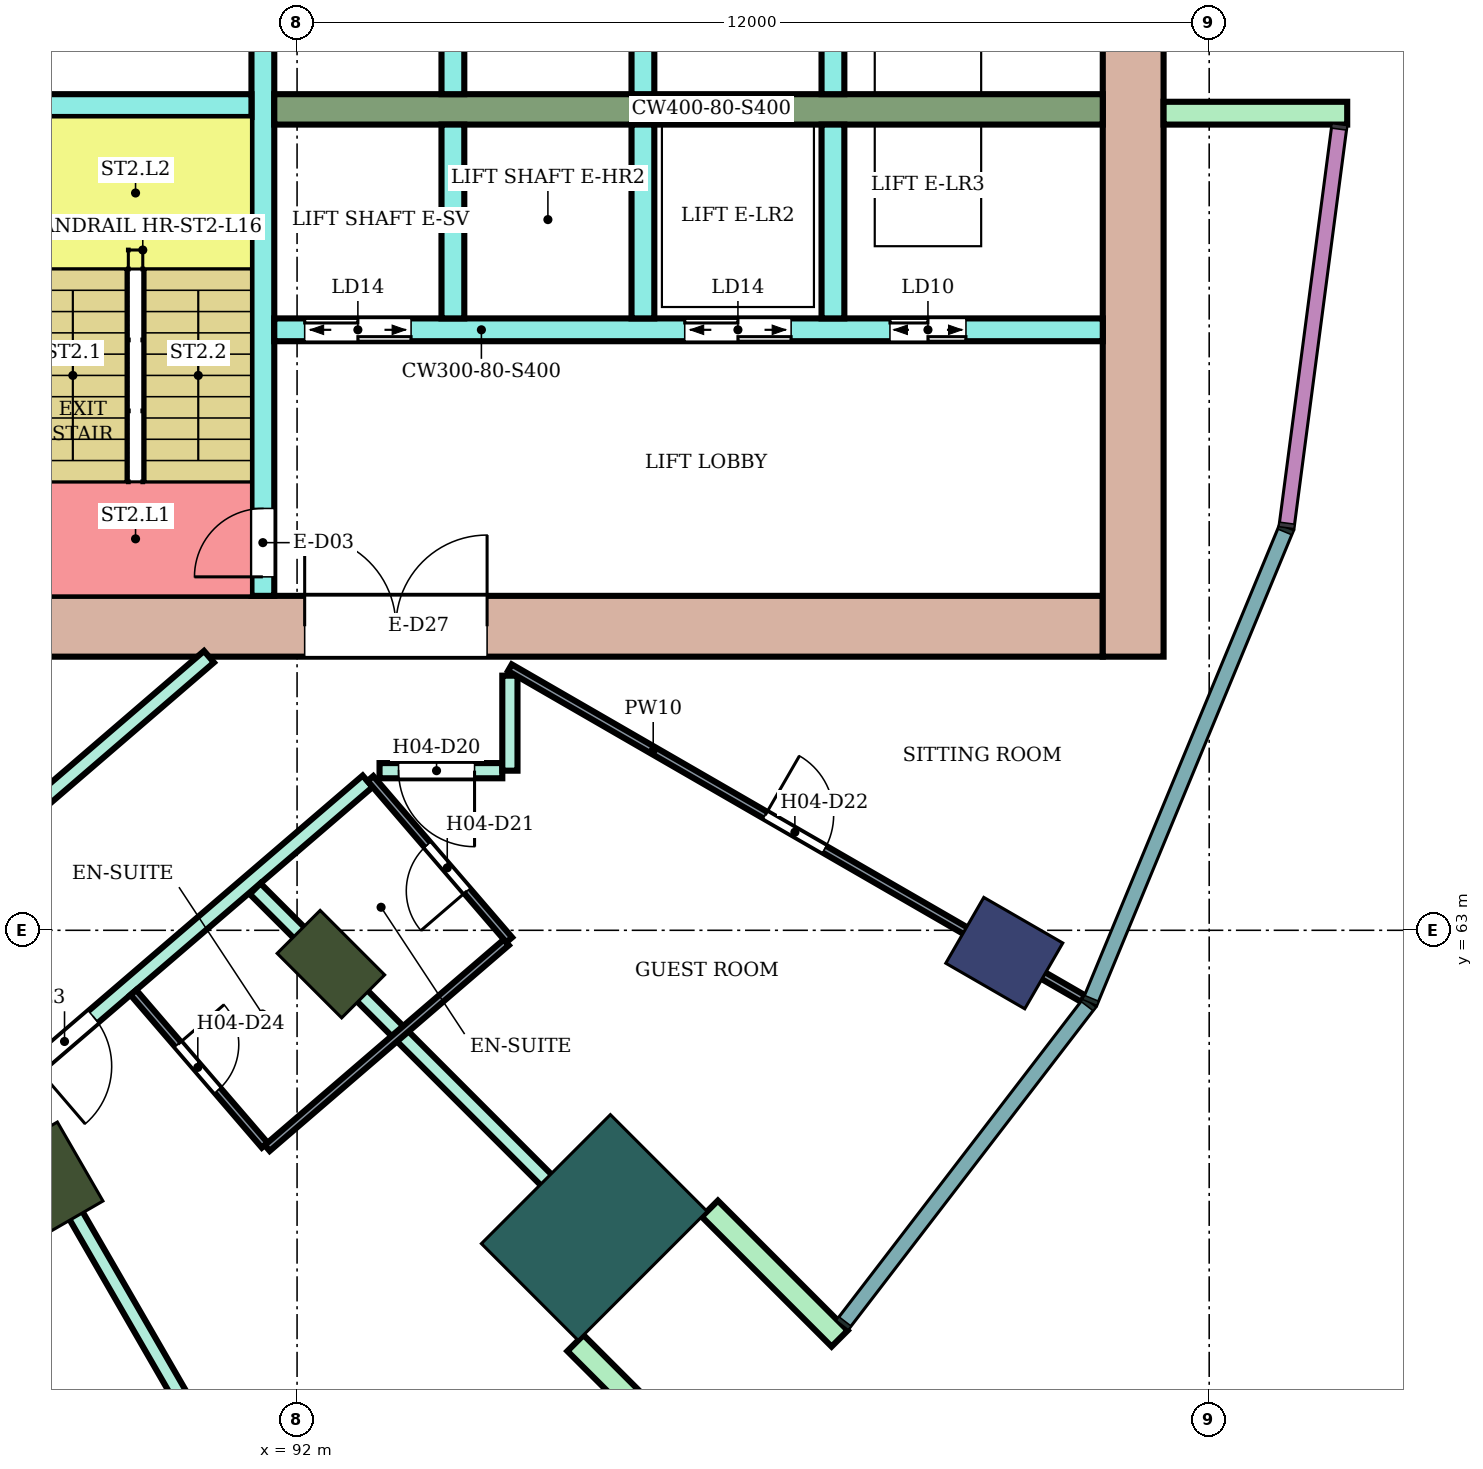
"""IFC4 building model, lengths in metres.
Left out: names, types, materials, properties, quantities, classifications, styles, units other than length and angle.
Written with IfcOpenShell. Run it as: python <this file> out.ifc"""

import sys

from ifc_helpers import new_model, si_unit, direction, frame, frame_2d, origin, origin_2d, place, context, subcontext, project, spatial, rectangle, extrude, element, fill, save


model = new_model("IFC4")
c1 = context("Model", 3, precision=1e-05, world=origin(), true_north=direction((0.0, 1.0)))
c2 = subcontext(c1, "Body", "Model", "MODEL_VIEW")
j1 = project(units=[si_unit("LENGTHUNIT", "METRE"), si_unit("PLANEANGLEUNIT", "RADIAN")], contexts=[c1])
p1 = place(None, origin())
s1 = spatial("IfcSite", under=j1, at=p1, CompositionType="ELEMENT")
p2 = place(p1, origin())
s2 = spatial("IfcBuilding", under=s1, at=p2, CompositionType="ELEMENT")
p3 = place(p2, frame((0.0, 0.0, 70.6)))
s3 = spatial("IfcBuildingStorey", under=s2, at=p3, CompositionType="ELEMENT", Elevation=70.6)
p4 = place(p3, frame((101.304, 62.7, 0.0), z_axis=(0.0, 0.0, 1.0), x_axis=(0.866025403784, -0.5, 0.0)))
e1 = element("IfcColumn", 1, at=p4, inside=s3, PredefinedType="COLUMN", context=c2, shape_type="SweptSolid", body=[
    extrude(rectangle(XDim=1.2, YDim=1.0, at=origin_2d()), origin(), (0.0, 0.0, 1.0), 3.8),
])
for number, where, z_axis, x_axis in (
    (2, (88.8, 59.758, 0.0), (0.0, 0.0, 1.0), (0.5, -0.866, 0.0)),
    (3, (92.445, 62.555, 0.0), (0.0, 0.0, 1.0), (0.707, -0.707, 0.0)),
):
    element("IfcColumn", number, at=place(p3, frame(where, z_axis=z_axis, x_axis=x_axis)), inside=s3, PredefinedType="COLUMN", context=c2, shape_type="SweptSolid", body=[
        extrude(rectangle(XDim=1.2, YDim=0.8, at=origin_2d()), origin(), (0.0, 0.0, 1.0), 3.8),
    ])
p5 = place(p3, frame((95.91, 59.09, 0.0), z_axis=(0.0, 0.0, 1.0), x_axis=(0.707106781187, -0.707106781187, 0.0)))
e4 = element("IfcColumn", 4, at=p5, inside=s3, PredefinedType="COLUMN", context=c2, shape_type="SweptSolid", body=[
    extrude(rectangle(XDim=1.8, YDim=2.4, at=origin_2d()), origin(), (0.0, 0.0, 1.0), 3.8),
])
p6 = place(p3, frame((87.9, 67.0, 0.0), z_axis=(0.0, 0.0, 1.0), x_axis=(1.0, 0.0, 0.0)))
e5 = element("IfcWall", 5, at=p6, inside=s3, PredefinedType="SHEAR", context=c2, shape_type="SweptSolid", body=[
    extrude(rectangle(XDim=14.7, YDim=0.8, at=frame_2d((7.35, 0.0))), origin(), (0.0, 0.0, 1.0), 3.4),
])
p7 = place(p6, frame((4.2, 0.0, 0.0)))
e6 = element("IfcOpeningElement", 6, at=p7, cuts=e5, PredefinedType="OPENING", context=c2, shape_type="SweptSolid", body=[
    extrude(rectangle(XDim=2.4, YDim=2.4, at=frame_2d((1.2, 1.2))), frame((0.0, 0.41, 0.0), z_axis=(0.0, -1.0, 0.0), x_axis=(1.0, 0.0, 0.0)), (0.0, 0.0, 1.0), 0.82),
])
p8 = place(p3, frame((103.0, 66.6, 0.0), z_axis=(0.0, 0.0, 1.0), x_axis=(0.0, 1.0, 0.0)))
e7 = element("IfcWall", 7, at=p8, inside=s3, PredefinedType="SHEAR", context=c2, shape_type="SweptSolid", body=[
    extrude(rectangle(XDim=16.8, YDim=0.8, at=frame_2d((8.4, 0.0))), origin(), (0.0, 0.0, 1.0), 3.4),
])
p9 = place(p3, frame((91.55, 67.4, 0.0), z_axis=(0.0, 0.0, 1.0), x_axis=(0.0, 1.0, 0.0)))
e8 = element("IfcWall", 8, at=p9, inside=s3, PredefinedType="SHEAR", context=c2, shape_type="SweptSolid", body=[
    extrude(rectangle(XDim=7.6, YDim=0.3, at=frame_2d((3.8, 0.0))), origin(), (0.0, 0.0, 1.0), 3.4),
])
p10 = place(p9, frame((0.25, 0.0, 0.0)))
e9 = element("IfcOpeningElement", 9, at=p10, cuts=e8, PredefinedType="OPENING", context=c2, shape_type="SweptSolid", body=[
    extrude(rectangle(XDim=0.9, YDim=2.1, at=frame_2d((0.45, 1.05))), frame((0.0, 0.16, 0.0), z_axis=(0.0, -1.0, 0.0), x_axis=(1.0, 0.0, 0.0)), (0.0, 0.0, 1.0), 0.32),
])
p11 = place(p3, frame((88.35, 73.85, 0.0), z_axis=(0.0, 0.0, 1.0), x_axis=(1.0, 0.0, 0.0)))
e10 = element("IfcWall", 10, at=p11, inside=s3, PredefinedType="SHEAR", context=c2, shape_type="SweptSolid", body=[
    extrude(rectangle(XDim=3.05, YDim=0.3, at=frame_2d((1.525, 0.0))), origin(), (0.0, 0.0, 1.0), 3.4),
])
p12 = place(p3, frame((91.7, 73.8, 0.0), z_axis=(0.0, 0.0, 1.0), x_axis=(1.0, 0.0, 0.0)))
e11 = element("IfcWall", 11, at=p12, inside=s3, PredefinedType="SHEAR", context=c2, shape_type="SweptSolid", body=[
    extrude(rectangle(XDim=10.9, YDim=0.4, at=frame_2d((5.45, 0.0))), origin(), (0.0, 0.0, 1.0), 3.4),
])
p13 = place(p3, frame((91.7, 70.9, 0.0), z_axis=(0.0, 0.0, 1.0), x_axis=(1.0, 0.0, 0.0)))
e12 = element("IfcWall", 12, at=p13, inside=s3, PredefinedType="SHEAR", context=c2, shape_type="SweptSolid", body=[
    extrude(rectangle(XDim=10.9, YDim=0.3, at=frame_2d((5.45, 0.0))), origin(), (0.0, 0.0, 1.0), 3.4),
])
p14 = place(p13, frame((0.4, 0.0, 0.0)))
e13 = element("IfcOpeningElement", 13, at=p14, cuts=e12, PredefinedType="OPENING", context=c2, shape_type="SweptSolid", body=[
    extrude(rectangle(XDim=1.4, YDim=2.1, at=frame_2d((0.7, 1.05))), frame((0.0, 0.16, 0.0), z_axis=(0.0, -1.0, 0.0), x_axis=(1.0, 0.0, 0.0)), (0.0, 0.0, 1.0), 0.32),
])
p15 = place(p13, frame((5.4, 0.0, 0.0)))
e14 = element("IfcOpeningElement", 14, at=p15, cuts=e12, PredefinedType="OPENING", context=c2, shape_type="SweptSolid", body=[
    extrude(rectangle(XDim=1.4, YDim=2.1, at=frame_2d((0.7, 1.05))), frame((0.0, 0.16, 0.0), z_axis=(0.0, -1.0, 0.0), x_axis=(1.0, 0.0, 0.0)), (0.0, 0.0, 1.0), 0.32),
])
p16 = place(p13, frame((8.1, 0.0, 0.0)))
e15 = element("IfcOpeningElement", 15, at=p16, cuts=e12, PredefinedType="OPENING", context=c2, shape_type="SweptSolid", body=[
    extrude(rectangle(XDim=1.0, YDim=2.1, at=frame_2d((0.5, 1.05))), frame((0.0, 0.16, 0.0), z_axis=(0.0, -1.0, 0.0), x_axis=(1.0, 0.0, 0.0)), (0.0, 0.0, 1.0), 0.32),
])
for number, where, z_axis, x_axis in (
    (16, (94.05, 74.0, 0.0), (0.0, 0.0, 1.0), (0.0, 1.0, 0.0)),
    (17, (96.55, 74.0, 0.0), (0.0, 0.0, 1.0), (0.0, 1.0, 0.0)),
    (18, (99.05, 74.0, 0.0), (0.0, 0.0, 1.0), (0.0, 1.0, 0.0)),
    (19, (94.05, 71.05, 0.0), (0.0, 0.0, 1.0), (0.0, 1.0, 0.0)),
    (20, (96.55, 71.05, 0.0), (0.0, 0.0, 1.0), (0.0, 1.0, 0.0)),
    (21, (99.05, 71.05, 0.0), (0.0, 0.0, 1.0), (0.0, 1.0, 0.0)),
):
    element("IfcWall", number, at=place(p3, frame(where, z_axis=z_axis, x_axis=x_axis)), inside=s3, PredefinedType="SHEAR", context=c2, shape_type="SweptSolid", body=[
        extrude(rectangle(XDim=2.55, YDim=0.3, at=frame_2d((1.275, 0.0))), origin(), (0.0, 0.0, 1.0), 3.4),
    ])
for number, where, z_axis, x_axis in (
    (22, (103.4, 73.75, 0.0), (0.0, 0.0, 1.0), (1.0, 0.0, 0.0)),
    (23, (95.662, 57.57, 0.0), (0.0, 0.0, 1.0), (0.707, -0.707, 0.0)),
    (24, (97.43, 59.338, 0.0), (0.0, 0.0, 1.0), (0.707, -0.707, 0.0)),
):
    element("IfcWall", number, at=place(p3, frame(where, z_axis=z_axis, x_axis=x_axis)), inside=s3, PredefinedType="NOTDEFINED", context=c2, shape_type="SweptSolid", body=[
        extrude(rectangle(XDim=2.416, YDim=0.3, at=frame_2d((1.208, 0.0))), origin(), (0.0, 0.0, 1.0), 3.8),
    ])
p17 = place(p3, frame((86.877, 63.189, 0.0), z_axis=(0.0, 0.0, 1.0), x_axis=(0.758088707506, 0.652151448325, 0.0)))
e25 = element("IfcWall", 25, at=p17, inside=s3, PredefinedType="PARTITIONING", context=c2, shape_type="SweptSolid", body=[
    extrude(rectangle(XDim=5.229, YDim=0.2, at=frame_2d((2.615, 0.0))), origin(), (0.0, 0.0, 1.0), 3.35),
])
p18 = place(p3, frame((88.235, 60.931, 0.0), z_axis=(0.0, 0.0, 1.0), x_axis=(0.758799498714, 0.651324282329, 0.0)))
e26 = element("IfcWall", 26, at=p18, inside=s3, PredefinedType="PARTITIONING", context=c2, shape_type="SweptSolid", body=[
    extrude(rectangle(XDim=6.186, YDim=0.2, at=frame_2d((3.093, 0.0))), origin(), (0.0, 0.0, 1.0), 3.35),
])
p19 = place(p18, frame((0.43, 0.0, 0.0)))
e27 = element("IfcOpeningElement", 27, at=p19, cuts=e26, PredefinedType="OPENING", context=c2, shape_type="SweptSolid", body=[
    extrude(rectangle(XDim=1.0, YDim=2.1, at=frame_2d((0.5, 1.05))), frame((0.0, 0.11, 0.0), z_axis=(0.0, -1.0, 0.0), x_axis=(1.0, 0.0, 0.0)), (0.0, 0.0, 1.0), 0.22),
])
p20 = place(p3, frame((88.159, 60.863, 0.0), z_axis=(0.0, 0.0, 1.0), x_axis=(0.499935840196, -0.866062443296, 0.0)))
e28 = element("IfcWall", 28, at=p20, inside=s3, PredefinedType="PARTITIONING", context=c2, shape_type="SweptSolid", body=[
    extrude(rectangle(XDim=9.475, YDim=0.2, at=frame_2d((4.737, 0.0))), origin(), (0.0, 0.0, 1.0), 3.35),
])
p21 = place(p3, frame((91.448, 63.547, 0.0), z_axis=(0.0, 0.0, 1.0), x_axis=(0.706984810649, -0.707228730688, 0.0)))
e29 = element("IfcWall", 29, at=p21, inside=s3, PredefinedType="PARTITIONING", context=c2, shape_type="SweptSolid", body=[
    extrude(rectangle(XDim=7.006, YDim=0.2, at=frame_2d((3.503, 0.0))), origin(), (0.0, 0.0, 1.0), 3.35),
])
p22 = place(p3, frame((93.085, 65.1, 0.0), z_axis=(0.0, 0.0, 1.0), x_axis=(1.0, 0.0, 0.0)))
e30 = element("IfcWall", 30, at=p22, inside=s3, PredefinedType="PARTITIONING", context=c2, shape_type="SweptSolid", body=[
    extrude(rectangle(XDim=1.615, YDim=0.2, at=frame_2d((0.808, 0.0))), origin(), (0.0, 0.0, 1.0), 3.35),
])
p23 = place(p22, frame((0.25, 0.0, 0.0)))
e31 = element("IfcOpeningElement", 31, at=p23, cuts=e30, PredefinedType="OPENING", context=c2, shape_type="SweptSolid", body=[
    extrude(rectangle(XDim=1.0, YDim=2.1, at=frame_2d((0.5, 1.05))), frame((0.0, 0.11, 0.0), z_axis=(0.0, -1.0, 0.0), x_axis=(1.0, 0.0, 0.0)), (0.0, 0.0, 1.0), 0.22),
])
p24 = place(p3, frame((94.8, 65.1, 0.0), z_axis=(0.0, 0.0, 1.0), x_axis=(0.0, 1.0, 0.0)))
e32 = element("IfcWall", 32, at=p24, inside=s3, PredefinedType="PARTITIONING", context=c2, shape_type="SweptSolid", body=[
    extrude(rectangle(XDim=1.25, YDim=0.2, at=frame_2d((0.625, 0.0))), origin(), (0.0, 0.0, 1.0), 3.35),
])
p25 = place(p3, frame((89.846, 62.182, 0.0), z_axis=(0.0, 0.0, 1.0), x_axis=(0.652095405055, -0.758136915541, 0.0)))
e33 = element("IfcWall", 33, at=p25, inside=s3, PredefinedType="PARTITIONING", context=c2, shape_type="SweptSolid", body=[
    extrude(rectangle(XDim=2.65, YDim=0.1, at=frame_2d((1.325, 0.0))), origin(), (0.0, 0.0, 1.0), 3.35),
])
p26 = place(p25, frame((0.9, 0.0, 0.0)))
e34 = element("IfcOpeningElement", 34, at=p26, cuts=e33, PredefinedType="OPENING", context=c2, shape_type="SweptSolid", body=[
    extrude(rectangle(XDim=0.8, YDim=2.1, at=frame_2d((0.4, 1.05))), frame((0.0, 0.06, 0.0), z_axis=(0.0, -1.0, 0.0), x_axis=(1.0, 0.0, 0.0)), (0.0, 0.0, 1.0), 0.12),
])
p27 = place(p3, frame((91.607, 60.135, 0.0), z_axis=(0.0, 0.0, 1.0), x_axis=(0.758121792225, 0.65211298726, 0.0)))
e35 = element("IfcWall", 35, at=p27, inside=s3, PredefinedType="PARTITIONING", context=c2, shape_type="SweptSolid", body=[
    extrude(rectangle(XDim=4.15, YDim=0.1, at=frame_2d((2.075, 0.0))), origin(), (0.0, 0.0, 1.0), 3.35),
])
p28 = place(p3, frame((92.965, 64.997, 0.0), z_axis=(0.0, 0.0, 1.0), x_axis=(0.652104424393, -0.758129157655, 0.0)))
e36 = element("IfcWall", 36, at=p28, inside=s3, PredefinedType="PARTITIONING", context=c2, shape_type="SweptSolid", body=[
    extrude(rectangle(XDim=2.8, YDim=0.1, at=frame_2d((1.4, 0.0))), origin(), (0.0, 0.0, 1.0), 3.35),
])
p29 = place(p28, frame((1.15, 0.0, 0.0)))
e37 = element("IfcOpeningElement", 37, at=p29, cuts=e36, PredefinedType="OPENING", context=c2, shape_type="SweptSolid", body=[
    extrude(rectangle(XDim=0.8, YDim=2.1, at=frame_2d((0.4, 1.05))), frame((0.0, 0.06, 0.0), z_axis=(0.0, -1.0, 0.0), x_axis=(1.0, 0.0, 0.0)), (0.0, 0.0, 1.0), 0.12),
])
p30 = place(p3, frame((94.8, 66.455, 0.0), z_axis=(0.0, 0.0, 1.0), x_axis=(0.86602264145, -0.500004784474, 0.0)))
e38 = element("IfcWall", 38, at=p30, inside=s3, PredefinedType="PARTITIONING", context=c2, shape_type="SweptSolid", body=[
    extrude(rectangle(XDim=8.708, YDim=0.1, at=frame_2d((4.354, 0.0))), origin(), (0.0, 0.0, 1.0), 3.35),
])
p31 = place(p30, frame((3.879, 0.0, 0.0)))
e39 = element("IfcOpeningElement", 39, at=p31, cuts=e38, PredefinedType="OPENING", context=c2, shape_type="SweptSolid", body=[
    extrude(rectangle(XDim=0.9, YDim=2.1, at=frame_2d((0.45, 1.05))), frame((0.0, 0.06, 0.0), z_axis=(0.0, -1.0, 0.0), x_axis=(1.0, 0.0, 0.0)), (0.0, 0.0, 1.0), 0.12),
])
p32 = place(p23, frame((1.0, 0.0, 0.0), z_axis=(0.0, 0.0, 1.0), x_axis=(-1.0, 0.0, 0.0)))
e40 = element("IfcDoor", 40, at=p32, inside=s3, OperationType="SINGLE_SWING_LEFT", PredefinedType="DOOR", context=c2, shape_type="SweptSolid", body=[
    extrude(rectangle(XDim=1.0, YDim=2.1, at=frame_2d((0.5, 1.05))), frame((0.0, 0.025, 0.0), z_axis=(0.0, -1.0, 0.0), x_axis=(1.0, 0.0, 0.0)), (0.0, 0.0, 1.0), 0.05),
])
fill(e31, e40)
p33 = place(p29, frame((0.8, 0.0, 0.0), z_axis=(0.0, 0.0, 1.0), x_axis=(-1.0, 0.0, 0.0)))
e41 = element("IfcDoor", 41, at=p33, inside=s3, OperationType="SINGLE_SWING_LEFT", PredefinedType="DOOR", context=c2, shape_type="SweptSolid", body=[
    extrude(rectangle(XDim=0.8, YDim=2.1, at=frame_2d((0.4, 1.05))), frame((0.0, 0.025, 0.0), z_axis=(0.0, -1.0, 0.0), x_axis=(1.0, 0.0, 0.0)), (0.0, 0.0, 1.0), 0.05),
])
fill(e37, e41)
p34 = place(p31, origin())
e42 = element("IfcDoor", 42, at=p34, inside=s3, OperationType="SINGLE_SWING_LEFT", PredefinedType="DOOR", context=c2, shape_type="SweptSolid", body=[
    extrude(rectangle(XDim=0.9, YDim=2.1, at=frame_2d((0.45, 1.05))), frame((0.0, 0.025, 0.0), z_axis=(0.0, -1.0, 0.0), x_axis=(1.0, 0.0, 0.0)), (0.0, 0.0, 1.0), 0.05),
])
fill(e39, e42)
p35 = place(p19, frame((1.0, 0.0, 0.0), z_axis=(0.0, 0.0, 1.0), x_axis=(-1.0, 0.0, 0.0)))
e43 = element("IfcDoor", 43, at=p35, inside=s3, OperationType="SINGLE_SWING_RIGHT", PredefinedType="DOOR", context=c2, shape_type="SweptSolid", body=[
    extrude(rectangle(XDim=1.0, YDim=2.1, at=frame_2d((0.5, 1.05))), frame((0.0, 0.025, 0.0), z_axis=(0.0, -1.0, 0.0), x_axis=(1.0, 0.0, 0.0)), (0.0, 0.0, 1.0), 0.05),
])
fill(e27, e43)
p36 = place(p26, origin())
e44 = element("IfcDoor", 44, at=p36, inside=s3, OperationType="SINGLE_SWING_LEFT", PredefinedType="DOOR", context=c2, shape_type="SweptSolid", body=[
    extrude(rectangle(XDim=0.8, YDim=2.1, at=frame_2d((0.4, 1.05))), frame((0.0, 0.025, 0.0), z_axis=(0.0, -1.0, 0.0), x_axis=(1.0, 0.0, 0.0)), (0.0, 0.0, 1.0), 0.05),
])
fill(e34, e44)
p37 = place(p10, origin())
e45 = element("IfcDoor", 45, at=p37, inside=s3, OperationType="SINGLE_SWING_LEFT", PredefinedType="DOOR", context=c2, shape_type="SweptSolid", body=[
    extrude(rectangle(XDim=0.9, YDim=2.1, at=frame_2d((0.45, 1.05))), frame((0.0, 0.025, 0.0), z_axis=(0.0, -1.0, 0.0), x_axis=(1.0, 0.0, 0.0)), (0.0, 0.0, 1.0), 0.05),
])
fill(e9, e45)
p38 = place(p14, origin())
e46 = element("IfcDoor", 46, at=p38, inside=s3, OperationType="DOUBLE_DOOR_SLIDING", PredefinedType="DOOR", context=c2, shape_type="SweptSolid", body=[
    extrude(rectangle(XDim=1.4, YDim=2.1, at=frame_2d((0.7, 1.05))), frame((0.0, 0.025, 0.0), z_axis=(0.0, -1.0, 0.0), x_axis=(1.0, 0.0, 0.0)), (0.0, 0.0, 1.0), 0.05),
])
fill(e13, e46)
p39 = place(p15, origin())
e47 = element("IfcDoor", 47, at=p39, inside=s3, OperationType="DOUBLE_DOOR_SLIDING", PredefinedType="DOOR", context=c2, shape_type="SweptSolid", body=[
    extrude(rectangle(XDim=1.4, YDim=2.1, at=frame_2d((0.7, 1.05))), frame((0.0, 0.025, 0.0), z_axis=(0.0, -1.0, 0.0), x_axis=(1.0, 0.0, 0.0)), (0.0, 0.0, 1.0), 0.05),
])
fill(e14, e47)
p40 = place(p16, origin())
e48 = element("IfcDoor", 48, at=p40, inside=s3, OperationType="DOUBLE_DOOR_SLIDING", PredefinedType="DOOR", context=c2, shape_type="SweptSolid", body=[
    extrude(rectangle(XDim=1.0, YDim=2.1, at=frame_2d((0.5, 1.05))), frame((0.0, 0.025, 0.0), z_axis=(0.0, -1.0, 0.0), x_axis=(1.0, 0.0, 0.0)), (0.0, 0.0, 1.0), 0.05),
])
fill(e15, e48)
p41 = place(p7, origin())
e49 = element("IfcDoor", 49, at=p41, inside=s3, OperationType="DOUBLE_DOOR_SINGLE_SWING", PredefinedType="DOOR", context=c2, shape_type="SweptSolid", body=[
    extrude(rectangle(XDim=2.4, YDim=2.4, at=frame_2d((1.2, 1.2))), frame((0.0, 0.025, 0.0), z_axis=(0.0, -1.0, 0.0), x_axis=(1.0, 0.0, 0.0)), (0.0, 0.0, 1.0), 0.05),
])
fill(e6, e49)
save(model, sys.argv[1])
